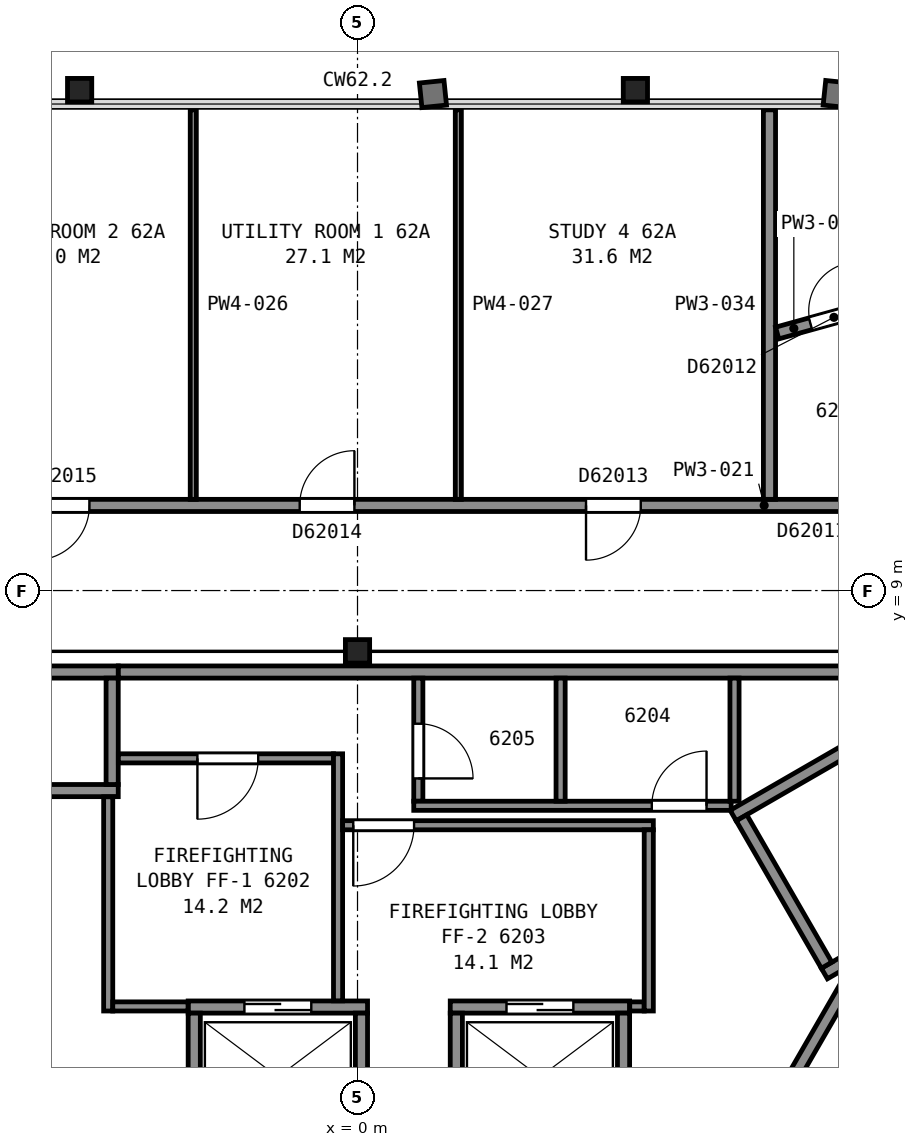
"""IFC4 building model, lengths in metres.
Left out: names, types, materials, properties, quantities, classifications, styles, units other than length and angle.
Written with IfcOpenShell. Run it as: python <this file> out.ifc"""

import sys

from ifc_helpers import new_model, si_unit, direction, frame, frame_2d, origin, origin_2d, place, context, subcontext, project, spatial, rectangle, i_section, extrude, element, fill, save


model = new_model("IFC4")
c1 = context("Model", 3, precision=1e-05, world=origin(), true_north=direction((0.0, 1.0)))
c2 = subcontext(c1, "Body", "Model", "MODEL_VIEW")
j1 = project(units=[si_unit("LENGTHUNIT", "METRE"), si_unit("PLANEANGLEUNIT", "RADIAN")], contexts=[c1])
p1 = place(None, origin())
s1 = spatial("IfcSite", under=j1, at=p1, CompositionType="ELEMENT")
p2 = place(p1, origin())
s2 = spatial("IfcBuilding", under=s1, at=p2, CompositionType="ELEMENT")
p3 = place(p2, frame((0.0, 0.0, 247.1)))
s3 = spatial("IfcBuildingStorey", under=s2, at=p3, CompositionType="ELEMENT", Elevation=247.1)
for number, where, z_axis, x_axis in (
    (1, (4.57, 17.23, 0.035), (0.0, 0.0, 1.0), (1.0, 0.0, 0.0)),
    (2, (-4.57, 17.23, 0.035), (0.0, 0.0, 1.0), (1.0, 0.0, 0.0)),
):
    element("IfcColumn", number, at=place(p3, frame(where, z_axis=z_axis, x_axis=x_axis)), inside=s3, PredefinedType="COLUMN", context=c2, shape_type="SweptSolid", body=[
        extrude(i_section(OverallWidth=0.399, OverallDepth=0.386, WebThickness=0.021, FlangeThickness=0.033, FilletRadius=0.015, at=origin_2d()), origin(), (0.0, 0.0, 1.0), 3.665),
    ])
p4 = place(p3, frame((0.0, 8.0, 0.0), z_axis=(0.0, 0.0, 1.0), x_axis=(1.0, 0.0, 0.0)))
e3 = element("IfcColumn", 3, at=p4, inside=s3, PredefinedType="COLUMN", context=c2, shape_type="SweptSolid", body=[
    extrude(i_section(OverallWidth=0.399, OverallDepth=0.386, WebThickness=0.021, FlangeThickness=0.033, FilletRadius=0.015, at=origin_2d()), origin(), (0.0, 0.0, 1.0), 3.7),
])
for number, where, z_axis, x_axis in (
    (4, (6.178, 5.299, 0.0), (0.0, 0.0, 1.0), (0.866, 0.5, 0.0)),
    (5, (7.678, 2.701, 0.0), (0.0, 0.0, 1.0), (0.866, 0.5, 0.0)),
):
    element("IfcWall", number, at=place(p3, frame(where, z_axis=z_axis, x_axis=x_axis)), inside=s3, PredefinedType="PARTITIONING", context=c2, shape_type="SweptSolid", body=[
        extrude(rectangle(XDim=9.6, YDim=0.2, at=frame_2d((4.8, 0.0))), origin(), (0.0, 0.0, 1.0), 3.45),
    ])
p5 = place(p3, frame((7.715, 2.838, 0.0), z_axis=(0.0, 0.0, 1.0), x_axis=(-0.500049511043, 0.865996816683, 0.0)))
e6 = element("IfcWall", 6, at=p5, inside=s3, PredefinedType="PARTITIONING", context=c2, shape_type="SweptSolid", body=[
    extrude(rectangle(XDim=2.8, YDim=0.2, at=frame_2d((1.4, 0.0))), origin(), (0.0, 0.0, 1.0), 3.45),
])
p6 = place(p3, frame((-2.785, 2.15, 0.0), z_axis=(0.0, 0.0, 1.0), x_axis=(1.0, 0.0, 0.0)))
e7 = element("IfcWall", 7, at=p6, inside=s3, PredefinedType="PARTITIONING", context=c2, shape_type="SweptSolid", body=[
    extrude(rectangle(XDim=2.95, YDim=0.2, at=frame_2d((1.475, 0.0))), origin(), (0.0, 0.0, 1.0), 3.7),
])
p7 = place(p6, frame((0.925, 0.0, 0.0)))
e8 = element("IfcOpeningElement", 8, at=p7, cuts=e7, PredefinedType="OPENING", context=c2, shape_type="SweptSolid", body=[
    extrude(rectangle(XDim=1.1, YDim=2.1, at=frame_2d((0.55, 1.05))), frame((0.0, 0.11, 0.0), z_axis=(0.0, -1.0, 0.0), x_axis=(1.0, 0.0, 0.0)), (0.0, 0.0, 1.0), 0.22),
])
p8 = place(p3, frame((1.525, 2.15, 0.0), z_axis=(0.0, 0.0, 1.0), x_axis=(1.0, 0.0, 0.0)))
e9 = element("IfcWall", 9, at=p8, inside=s3, PredefinedType="PARTITIONING", context=c2, shape_type="SweptSolid", body=[
    extrude(rectangle(XDim=2.95, YDim=0.2, at=frame_2d((1.475, 0.0))), origin(), (0.0, 0.0, 1.0), 3.7),
])
p9 = place(p8, frame((0.925, 0.0, 0.0)))
e10 = element("IfcOpeningElement", 10, at=p9, cuts=e9, PredefinedType="OPENING", context=c2, shape_type="SweptSolid", body=[
    extrude(rectangle(XDim=1.1, YDim=2.1, at=frame_2d((0.55, 1.05))), frame((0.0, 0.11, 0.0), z_axis=(0.0, -1.0, 0.0), x_axis=(1.0, 0.0, 0.0)), (0.0, 0.0, 1.0), 0.22),
])
for number, where, z_axis, x_axis in (
    (11, (-6.285, 5.71, 0.0), (0.0, 0.0, 1.0), (1.0, 0.0, 0.0)),
    (12, (-6.285, 7.66, 0.0), (0.0, 0.0, 1.0), (1.0, 0.0, 0.0)),
):
    element("IfcWall", number, at=place(p3, frame(where, z_axis=z_axis, x_axis=x_axis)), inside=s3, PredefinedType="PARTITIONING", context=c2, shape_type="SweptSolid", body=[
        extrude(rectangle(XDim=2.35, YDim=0.2, at=frame_2d((1.175, 0.0))), origin(), (0.0, 0.0, 1.0), 3.7),
    ])
p10 = place(p3, frame((7.351, -2.587, 0.0), z_axis=(0.0, 0.0, 1.0), x_axis=(0.500002801628, 0.866023786258, 0.0)))
e13 = element("IfcWall", 13, at=p10, inside=s3, PredefinedType="PARTITIONING", context=c2, shape_type="SweptSolid", body=[
    extrude(rectangle(XDim=4.9, YDim=0.2, at=frame_2d((2.45, 0.0))), origin(), (0.0, 0.0, 1.0), 3.7),
])
p11 = place(p3, frame((5.663, -1.612, 0.0), z_axis=(0.0, 0.0, 1.0), x_axis=(0.49998122708, 0.866036242063, 0.0)))
e14 = element("IfcWall", 14, at=p11, inside=s3, PredefinedType="PARTITIONING", context=c2, shape_type="SweptSolid", body=[
    extrude(rectangle(XDim=4.9, YDim=0.2, at=frame_2d((2.45, 0.0))), origin(), (0.0, 0.0, 1.0), 3.7),
])
for number, where, z_axis, x_axis in (
    (15, (4.375, 0.1, 0.0), (0.0, 0.0, 1.0), (0.0, 1.0, 0.0)),
    (16, (1.625, 0.1, 0.0), (0.0, 0.0, 1.0), (0.0, 1.0, 0.0)),
    (17, (0.065, 0.1, 0.0), (0.0, 0.0, 1.0), (0.0, 1.0, 0.0)),
    (18, (-2.685, 0.1, 0.0), (0.0, 0.0, 1.0), (0.0, 1.0, 0.0)),
):
    element("IfcWall", number, at=place(p3, frame(where, z_axis=z_axis, x_axis=x_axis)), inside=s3, PredefinedType="PARTITIONING", context=c2, shape_type="SweptSolid", body=[
        extrude(rectangle(XDim=1.95, YDim=0.2, at=frame_2d((0.975, 0.0))), origin(), (0.0, 0.0, 1.0), 3.7),
    ])
p12 = place(p3, frame((-4.035, 5.81, 0.0), z_axis=(0.0, 0.0, 1.0), x_axis=(0.0, 1.0, 0.0)))
e19 = element("IfcWall", 19, at=p12, inside=s3, PredefinedType="PARTITIONING", context=c2, shape_type="SweptSolid", body=[
    extrude(rectangle(XDim=1.75, YDim=0.2, at=frame_2d((0.875, 0.0))), origin(), (0.0, 0.0, 1.0), 3.7),
])
p13 = place(p3, frame((-4.1, 2.085, 0.0), z_axis=(0.0, 0.0, 1.0), x_axis=(0.0, 1.0, 0.0)))
e20 = element("IfcWall", 20, at=p13, inside=s3, PredefinedType="PARTITIONING", context=c2, shape_type="SweptSolid", body=[
    extrude(rectangle(XDim=3.523, YDim=0.15, at=frame_2d((1.761, 0.0))), origin(), (0.0, 0.0, 1.0), 3.45),
])
p14 = place(p3, frame((-4.025, 2.16, 0.0), z_axis=(0.0, 0.0, 1.0), x_axis=(1.0, 0.0, 0.0)))
e21 = element("IfcWall", 21, at=p14, inside=s3, PredefinedType="PARTITIONING", context=c2, shape_type="SweptSolid", body=[
    extrude(rectangle(XDim=1.238, YDim=0.15, at=frame_2d((0.619, 0.0))), origin(), (0.0, 0.0, 1.0), 3.45),
])
p15 = place(p3, frame((-3.933, 6.24, 0.0), z_axis=(0.0, 0.0, 1.0), x_axis=(1.0, 0.0, 0.0)))
e22 = element("IfcWall", 22, at=p15, inside=s3, PredefinedType="PARTITIONING", context=c2, shape_type="SweptSolid", body=[
    extrude(rectangle(XDim=3.538, YDim=0.15, at=frame_2d((1.769, 0.0))), origin(), (0.0, 0.0, 1.0), 3.45),
])
p16 = place(p15, frame((1.3, 0.0, 0.0)))
e23 = element("IfcOpeningElement", 23, at=p16, cuts=e22, PredefinedType="OPENING", context=c2, shape_type="SweptSolid", body=[
    extrude(rectangle(XDim=1.0, YDim=2.1, at=frame_2d((0.5, 1.05))), frame((0.0, 0.085, 0.0), z_axis=(0.0, -1.0, 0.0), x_axis=(1.0, 0.0, 0.0)), (0.0, 0.0, 1.0), 0.17),
])
p17 = place(p3, frame((-3.933, 7.66, 0.0), z_axis=(0.0, 0.0, 1.0), x_axis=(1.0, 0.0, 0.0)))
e24 = element("IfcWall", 24, at=p17, inside=s3, PredefinedType="PARTITIONING", context=c2, shape_type="SweptSolid", body=[
    extrude(rectangle(XDim=13.841, YDim=0.2, at=frame_2d((6.92, 0.0))), origin(), (0.0, 0.0, 1.0), 3.45),
])
p18 = place(p3, frame((-0.32, 2.252, 0.0), z_axis=(0.0, 0.0, 1.0), x_axis=(0.0, 1.0, 0.0)))
e25 = element("IfcWall", 25, at=p18, inside=s3, PredefinedType="PARTITIONING", context=c2, shape_type="SweptSolid", body=[
    extrude(rectangle(XDim=4.063, YDim=0.15, at=frame_2d((2.031, 0.0))), origin(), (0.0, 0.0, 1.0), 3.45),
])
p19 = place(p3, frame((-0.245, 5.14, 0.0), z_axis=(0.0, 0.0, 1.0), x_axis=(1.0, 0.0, 0.0)))
e26 = element("IfcWall", 26, at=p19, inside=s3, PredefinedType="PARTITIONING", context=c2, shape_type="SweptSolid", body=[
    extrude(rectangle(XDim=5.11, YDim=0.15, at=frame_2d((2.555, 0.0))), origin(), (0.0, 0.0, 1.0), 3.45),
])
p20 = place(p19, frame((0.175, 0.0, 0.0)))
e27 = element("IfcOpeningElement", 27, at=p20, cuts=e26, PredefinedType="OPENING", context=c2, shape_type="SweptSolid", body=[
    extrude(rectangle(XDim=1.0, YDim=2.1, at=frame_2d((0.5, 1.05))), frame((0.0, 0.085, 0.0), z_axis=(0.0, -1.0, 0.0), x_axis=(1.0, 0.0, 0.0)), (0.0, 0.0, 1.0), 0.17),
])
p21 = place(p3, frame((1.0, 7.56, 0.0), z_axis=(0.0, 0.0, 1.0), x_axis=(0.0, -1.0, 0.0)))
e28 = element("IfcWall", 28, at=p21, inside=s3, PredefinedType="PARTITIONING", context=c2, shape_type="SweptSolid", body=[
    extrude(rectangle(XDim=2.025, YDim=0.15, at=frame_2d((1.013, 0.0))), origin(), (0.0, 0.0, 1.0), 3.45),
])
p22 = place(p21, frame((0.75, 0.0, 0.0)))
e29 = element("IfcOpeningElement", 29, at=p22, cuts=e28, PredefinedType="OPENING", context=c2, shape_type="SweptSolid", body=[
    extrude(rectangle(XDim=0.9, YDim=2.1, at=frame_2d((0.45, 1.05))), frame((0.0, 0.085, 0.0), z_axis=(0.0, -1.0, 0.0), x_axis=(1.0, 0.0, 0.0)), (0.0, 0.0, 1.0), 0.17),
])
p23 = place(p3, frame((0.925, 5.46, 0.0), z_axis=(0.0, 0.0, 1.0), x_axis=(1.0, 0.0, 0.0)))
e30 = element("IfcWall", 30, at=p23, inside=s3, PredefinedType="PARTITIONING", context=c2, shape_type="SweptSolid", body=[
    extrude(rectangle(XDim=5.22, YDim=0.15, at=frame_2d((2.61, 0.0))), origin(), (0.0, 0.0, 1.0), 3.45),
])
p24 = place(p23, frame((3.915, 0.0, 0.0)))
e31 = element("IfcOpeningElement", 31, at=p24, cuts=e30, PredefinedType="OPENING", context=c2, shape_type="SweptSolid", body=[
    extrude(rectangle(XDim=0.9, YDim=2.1, at=frame_2d((0.45, 1.05))), frame((0.0, 0.085, 0.0), z_axis=(0.0, -1.0, 0.0), x_axis=(1.0, 0.0, 0.0)), (0.0, 0.0, 1.0), 0.17),
])
p25 = place(p3, frame((3.34, 5.535, 0.0), z_axis=(0.0, 0.0, 1.0), x_axis=(0.0, 1.0, 0.0)))
e32 = element("IfcWall", 32, at=p25, inside=s3, PredefinedType="PARTITIONING", context=c2, shape_type="SweptSolid", body=[
    extrude(rectangle(XDim=2.025, YDim=0.15, at=frame_2d((1.013, 0.0))), origin(), (0.0, 0.0, 1.0), 3.45),
])
p26 = place(p3, frame((4.477, 2.16, 0.0), z_axis=(0.0, 0.0, 1.0), x_axis=(1.0, 0.0, 0.0)))
e33 = element("IfcWall", 33, at=p26, inside=s3, PredefinedType="PARTITIONING", context=c2, shape_type="SweptSolid", body=[
    extrude(rectangle(XDim=0.238, YDim=0.15, at=frame_2d((0.119, 0.0))), origin(), (0.0, 0.0, 1.0), 3.45),
])
p27 = place(p3, frame((4.79, 2.085, 0.0), z_axis=(0.0, 0.0, 1.0), x_axis=(0.0, 1.0, 0.0)))
e34 = element("IfcWall", 34, at=p27, inside=s3, PredefinedType="PARTITIONING", context=c2, shape_type="SweptSolid", body=[
    extrude(rectangle(XDim=2.98, YDim=0.15, at=frame_2d((1.49, 0.0))), origin(), (0.0, 0.0, 1.0), 3.45),
])
p28 = place(p3, frame((6.2, 5.535, 0.0), z_axis=(0.0, 0.0, 1.0), x_axis=(0.0, 1.0, 0.0)))
e35 = element("IfcWall", 35, at=p28, inside=s3, PredefinedType="PARTITIONING", context=c2, shape_type="SweptSolid", body=[
    extrude(rectangle(XDim=2.025, YDim=0.15, at=frame_2d((1.013, 0.0))), origin(), (0.0, 0.0, 1.0), 3.45),
])
p29 = place(p3, frame((-4.675, -12.706, 0.0), z_axis=(0.0, 0.0, 1.0), x_axis=(-0.499972470324, 0.866041297467, 0.0)))
e36 = element("IfcWall", 36, at=p29, inside=s3, PredefinedType="PARTITIONING", context=c2, shape_type="SweptSolid", body=[
    extrude(rectangle(XDim=17.385, YDim=0.2, at=frame_2d((8.692, 0.0))), origin(), (0.0, 0.0, 1.0), 2.713),
])
p30 = place(p29, frame((14.57, 0.0, 0.0)))
e37 = element("IfcOpeningElement", 37, at=p30, cuts=e36, PredefinedType="OPENING", context=c2, shape_type="SweptSolid", body=[
    extrude(rectangle(XDim=0.9, YDim=2.1, at=frame_2d((0.45, 1.05))), frame((0.0, 0.11, 0.0), z_axis=(0.0, -1.0, 0.0), x_axis=(1.0, 0.0, 0.0)), (0.0, 0.0, 1.0), 0.22),
])
p31 = place(p29, frame((11.777, 0.0, 0.0)))
e38 = element("IfcOpeningElement", 38, at=p31, cuts=e36, PredefinedType="OPENING", context=c2, shape_type="SweptSolid", body=[
    extrude(rectangle(XDim=0.9, YDim=2.1, at=frame_2d((0.45, 1.05))), frame((0.0, 0.11, 0.0), z_axis=(0.0, -1.0, 0.0), x_axis=(1.0, 0.0, 0.0)), (0.0, 0.0, 1.0), 0.22),
])
p32 = place(p29, frame((5.095, 0.0, 0.0)))
e39 = element("IfcOpeningElement", 39, at=p32, cuts=e36, PredefinedType="OPENING", context=c2, shape_type="SweptSolid", body=[
    extrude(rectangle(XDim=0.9, YDim=2.1, at=frame_2d((0.45, 1.05))), frame((0.0, 0.11, 0.0), z_axis=(0.0, -1.0, 0.0), x_axis=(1.0, 0.0, 0.0)), (0.0, 0.0, 1.0), 0.22),
])
p33 = place(p3, frame((-8.667, 10.4, 0.0), z_axis=(0.0, 0.0, 1.0), x_axis=(1.0, 0.0, 0.0)))
e40 = element("IfcWall", 40, at=p33, inside=s3, PredefinedType="PARTITIONING", context=c2, shape_type="SweptSolid", body=[
    extrude(rectangle(XDim=17.384, YDim=0.2, at=frame_2d((8.692, 0.0))), origin(), (0.0, 0.0, 1.0), 2.713),
])
p34 = place(p33, frame((12.425, 0.0, 0.0)))
e41 = element("IfcOpeningElement", 41, at=p34, cuts=e40, PredefinedType="OPENING", context=c2, shape_type="SweptSolid", body=[
    extrude(rectangle(XDim=0.9, YDim=2.1, at=frame_2d((0.45, 1.05))), frame((0.0, 0.11, 0.0), z_axis=(0.0, -1.0, 0.0), x_axis=(1.0, 0.0, 0.0)), (0.0, 0.0, 1.0), 0.22),
])
p35 = place(p33, frame((7.716, 0.0, 0.0)))
e42 = element("IfcOpeningElement", 42, at=p35, cuts=e40, PredefinedType="OPENING", context=c2, shape_type="SweptSolid", body=[
    extrude(rectangle(XDim=0.9, YDim=2.1, at=frame_2d((0.45, 1.05))), frame((0.0, 0.11, 0.0), z_axis=(0.0, -1.0, 0.0), x_axis=(1.0, 0.0, 0.0)), (0.0, 0.0, 1.0), 0.22),
])
p36 = place(p33, frame((3.358, 0.0, 0.0)))
e43 = element("IfcOpeningElement", 43, at=p36, cuts=e40, PredefinedType="OPENING", context=c2, shape_type="SweptSolid", body=[
    extrude(rectangle(XDim=0.9, YDim=2.1, at=frame_2d((0.45, 1.05))), frame((0.0, 0.11, 0.0), z_axis=(0.0, -1.0, 0.0), x_axis=(1.0, 0.0, 0.0)), (0.0, 0.0, 1.0), 0.22),
])
for number, where, z_axis, x_axis in (
    (44, (-2.701, 10.5, 0.0), (0.0, 0.0, 1.0), (0.0, 1.0, 0.0)),
    (45, (1.658, 10.5, 0.0), (0.0, 0.0, 1.0), (0.0, 1.0, 0.0)),
):
    element("IfcWall", number, at=place(p3, frame(where, z_axis=z_axis, x_axis=x_axis)), inside=s3, PredefinedType="PARTITIONING", context=c2, shape_type="SweptSolid", body=[
        extrude(rectangle(XDim=6.406, YDim=0.1, at=frame_2d((3.203, 0.0))), origin(), (0.0, 0.0, 1.0), 2.713),
    ])
p37 = place(p3, frame((13.342, 2.306, 0.0), z_axis=(0.0, 0.0, 1.0), x_axis=(-0.499983003136, -0.866035216706, 0.0)))
e46 = element("IfcWall", 46, at=p37, inside=s3, PredefinedType="PARTITIONING", context=c2, shape_type="SweptSolid", body=[
    extrude(rectangle(XDim=17.385, YDim=0.2, at=frame_2d((8.692, 0.0))), origin(), (0.0, 0.0, 1.0), 2.713),
])
p38 = place(p37, frame((15.185, 0.0, 0.0)))
e47 = element("IfcOpeningElement", 47, at=p38, cuts=e46, PredefinedType="OPENING", context=c2, shape_type="SweptSolid", body=[
    extrude(rectangle(XDim=0.9, YDim=2.1, at=frame_2d((0.45, 1.05))), frame((0.0, 0.11, 0.0), z_axis=(0.0, -1.0, 0.0), x_axis=(1.0, 0.0, 0.0)), (0.0, 0.0, 1.0), 0.22),
])
p39 = place(p37, frame((12.094, 0.0, 0.0)))
e48 = element("IfcOpeningElement", 48, at=p39, cuts=e46, PredefinedType="OPENING", context=c2, shape_type="SweptSolid", body=[
    extrude(rectangle(XDim=0.9, YDim=2.1, at=frame_2d((0.45, 1.05))), frame((0.0, 0.11, 0.0), z_axis=(0.0, -1.0, 0.0), x_axis=(1.0, 0.0, 0.0)), (0.0, 0.0, 1.0), 0.22),
])
p40 = place(p37, frame((5.867, 0.0, 0.0)))
e49 = element("IfcOpeningElement", 49, at=p40, cuts=e46, PredefinedType="OPENING", context=c2, shape_type="SweptSolid", body=[
    extrude(rectangle(XDim=0.9, YDim=2.1, at=frame_2d((0.45, 1.05))), frame((0.0, 0.11, 0.0), z_axis=(0.0, -1.0, 0.0), x_axis=(1.0, 0.0, 0.0)), (0.0, 0.0, 1.0), 0.22),
])
p41 = place(p37, frame((1.392, 0.0, 0.0)))
e50 = element("IfcOpeningElement", 50, at=p41, cuts=e46, PredefinedType="OPENING", context=c2, shape_type="SweptSolid", body=[
    extrude(rectangle(XDim=0.9, YDim=2.1, at=frame_2d((0.45, 1.05))), frame((0.0, 0.11, 0.0), z_axis=(0.0, -1.0, 0.0), x_axis=(1.0, 0.0, 0.0)), (0.0, 0.0, 1.0), 0.22),
])
p42 = place(p3, frame((6.775, 10.5, 0.0), z_axis=(0.0, 0.0, 1.0), x_axis=(0.0, 1.0, 0.0)))
e51 = element("IfcWall", 51, at=p42, inside=s3, PredefinedType="PARTITIONING", context=c2, shape_type="SweptSolid", body=[
    extrude(rectangle(XDim=6.406, YDim=0.2, at=frame_2d((3.203, 0.0))), origin(), (0.0, 0.0, 1.0), 2.713),
])
p43 = place(p3, frame((8.75, 13.747, 0.0), z_axis=(0.0, 0.0, 1.0), x_axis=(-0.963674591663, -0.267079166884, 0.0)))
e52 = element("IfcWall", 52, at=p43, inside=s3, PredefinedType="PARTITIONING", context=c2, shape_type="SweptSolid", body=[
    extrude(rectangle(XDim=1.918, YDim=0.2, at=frame_2d((0.959, 0.0))), origin(), (0.0, 0.0, 1.0), 2.713),
])
p44 = place(p43, frame((0.549, 0.0, 0.0)))
e53 = element("IfcOpeningElement", 53, at=p44, cuts=e52, PredefinedType="OPENING", context=c2, shape_type="SweptSolid", body=[
    extrude(rectangle(XDim=0.8, YDim=2.1, at=frame_2d((0.4, 1.05))), frame((0.0, 0.11, 0.0), z_axis=(0.0, -1.0, 0.0), x_axis=(1.0, 0.0, 0.0)), (0.0, 0.0, 1.0), 0.22),
])
p45 = place(p7, origin())
e54 = element("IfcDoor", 54, at=p45, inside=s3, OperationType="SLIDING_TO_LEFT", PredefinedType="DOOR", context=c2, shape_type="SweptSolid", body=[
    extrude(rectangle(XDim=1.1, YDim=2.1, at=frame_2d((0.55, 1.05))), frame((0.0, 0.025, 0.0), z_axis=(0.0, -1.0, 0.0), x_axis=(1.0, 0.0, 0.0)), (0.0, 0.0, 1.0), 0.05),
])
fill(e8, e54)
p46 = place(p9, origin())
e55 = element("IfcDoor", 55, at=p46, inside=s3, OperationType="SLIDING_TO_RIGHT", PredefinedType="DOOR", context=c2, shape_type="SweptSolid", body=[
    extrude(rectangle(XDim=1.1, YDim=2.1, at=frame_2d((0.55, 1.05))), frame((0.0, 0.025, 0.0), z_axis=(0.0, -1.0, 0.0), x_axis=(1.0, 0.0, 0.0)), (0.0, 0.0, 1.0), 0.05),
])
fill(e10, e55)
p47 = place(p16, origin())
e56 = element("IfcDoor", 56, at=p47, inside=s3, OperationType="SINGLE_SWING_LEFT", PredefinedType="DOOR", context=c2, shape_type="SweptSolid", body=[
    extrude(rectangle(XDim=1.0, YDim=2.1, at=frame_2d((0.5, 1.05))), frame((0.0, 0.025, 0.0), z_axis=(0.0, -1.0, 0.0), x_axis=(1.0, 0.0, 0.0)), (0.0, 0.0, 1.0), 0.05),
])
fill(e23, e56)
p48 = place(p20, origin())
e57 = element("IfcDoor", 57, at=p48, inside=s3, OperationType="SINGLE_SWING_LEFT", PredefinedType="DOOR", context=c2, shape_type="SweptSolid", body=[
    extrude(rectangle(XDim=1.0, YDim=2.1, at=frame_2d((0.5, 1.05))), frame((0.0, 0.025, 0.0), z_axis=(0.0, -1.0, 0.0), x_axis=(1.0, 0.0, 0.0)), (0.0, 0.0, 1.0), 0.05),
])
fill(e27, e57)
p49 = place(p22, origin())
e58 = element("IfcDoor", 58, at=p49, inside=s3, OperationType="SINGLE_SWING_RIGHT", PredefinedType="DOOR", context=c2, shape_type="SweptSolid", body=[
    extrude(rectangle(XDim=0.9, YDim=2.1, at=frame_2d((0.45, 1.05))), frame((0.0, 0.025, 0.0), z_axis=(0.0, -1.0, 0.0), x_axis=(1.0, 0.0, 0.0)), (0.0, 0.0, 1.0), 0.05),
])
fill(e29, e58)
p50 = place(p24, origin())
e59 = element("IfcDoor", 59, at=p50, inside=s3, OperationType="SINGLE_SWING_RIGHT", PredefinedType="DOOR", context=c2, shape_type="SweptSolid", body=[
    extrude(rectangle(XDim=0.9, YDim=2.1, at=frame_2d((0.45, 1.05))), frame((0.0, 0.025, 0.0), z_axis=(0.0, -1.0, 0.0), x_axis=(1.0, 0.0, 0.0)), (0.0, 0.0, 1.0), 0.05),
])
fill(e31, e59)
p51 = place(p34, origin())
e60 = element("IfcDoor", 60, at=p51, inside=s3, OperationType="SINGLE_SWING_LEFT", PredefinedType="DOOR", context=c2, shape_type="SweptSolid", body=[
    extrude(rectangle(XDim=0.9, YDim=2.1, at=frame_2d((0.45, 1.05))), frame((0.0, 0.025, 0.0), z_axis=(0.0, -1.0, 0.0), x_axis=(1.0, 0.0, 0.0)), (0.0, 0.0, 1.0), 0.05),
])
fill(e41, e60)
p52 = place(p35, origin())
e61 = element("IfcDoor", 61, at=p52, inside=s3, OperationType="SINGLE_SWING_RIGHT", PredefinedType="DOOR", context=c2, shape_type="SweptSolid", body=[
    extrude(rectangle(XDim=0.9, YDim=2.1, at=frame_2d((0.45, 1.05))), frame((0.0, 0.025, 0.0), z_axis=(0.0, -1.0, 0.0), x_axis=(1.0, 0.0, 0.0)), (0.0, 0.0, 1.0), 0.05),
])
fill(e42, e61)
p53 = place(p36, origin())
e62 = element("IfcDoor", 62, at=p53, inside=s3, OperationType="SINGLE_SWING_LEFT", PredefinedType="DOOR", context=c2, shape_type="SweptSolid", body=[
    extrude(rectangle(XDim=0.9, YDim=2.1, at=frame_2d((0.45, 1.05))), frame((0.0, 0.025, 0.0), z_axis=(0.0, -1.0, 0.0), x_axis=(1.0, 0.0, 0.0)), (0.0, 0.0, 1.0), 0.05),
])
fill(e43, e62)
p54 = place(p44, origin())
e63 = element("IfcDoor", 63, at=p54, inside=s3, OperationType="SINGLE_SWING_LEFT", PredefinedType="DOOR", context=c2, shape_type="SweptSolid", body=[
    extrude(rectangle(XDim=0.8, YDim=2.1, at=frame_2d((0.4, 1.05))), frame((0.0, 0.025, 0.0), z_axis=(0.0, -1.0, 0.0), x_axis=(1.0, 0.0, 0.0)), (0.0, 0.0, 1.0), 0.05),
])
fill(e53, e63)
save(model, sys.argv[1])
